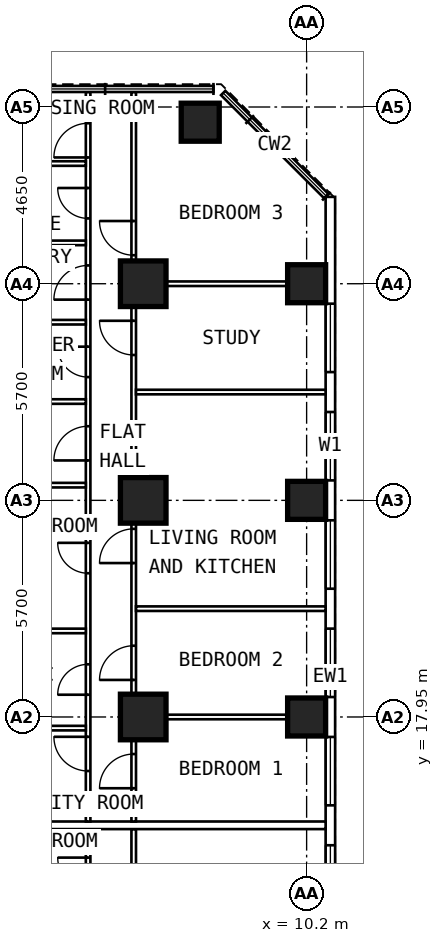
"""IFC4 building model, lengths in metres.
Left out: names, types, materials, properties, quantities, classifications, styles, units other than length and angle.
Written with IfcOpenShell. Run it as: python <this file> out.ifc"""

import sys

from ifc_helpers import new_model, si_unit, direction, frame, frame_2d, origin, origin_2d, place, context, subcontext, project, spatial, rectangle, extrude, element, fill, save


model = new_model("IFC4")
c1 = context("Model", 3, precision=1e-05, world=origin(), true_north=direction((0.0, 1.0)))
c2 = subcontext(c1, "Body", "Model", "MODEL_VIEW")
j1 = project(units=[si_unit("LENGTHUNIT", "METRE"), si_unit("PLANEANGLEUNIT", "RADIAN")], contexts=[c1])
p1 = place(None, origin())
s1 = spatial("IfcSite", under=j1, at=p1, CompositionType="ELEMENT")
p2 = place(p1, origin())
s2 = spatial("IfcBuilding", under=s1, at=p2, CompositionType="ELEMENT")
p3 = place(p2, frame((0.0, 0.0, 57.4)))
s3 = spatial("IfcBuildingStorey", under=s2, at=p3, CompositionType="ELEMENT", Elevation=57.4)
for number, where, z_axis, x_axis in (
    (1, (10.2, 17.95, 0.0), (0.0, 0.0, 1.0), (0.0, 1.0, 0.0)),
    (2, (10.2, 23.65, 0.0), (0.0, 0.0, 1.0), (0.0, 1.0, 0.0)),
    (3, (10.2, 29.35, 0.0), (0.0, 0.0, 1.0), (0.0, 1.0, 0.0)),
    (4, (7.4, 33.6, 0.0), (0.0, 0.0, 1.0), (0.0, 1.0, 0.0)),
):
    element("IfcColumn", number, at=place(p3, frame(where, z_axis=z_axis, x_axis=x_axis)), inside=s3, PredefinedType="COLUMN", context=c2, shape_type="SweptSolid", body=[
        extrude(rectangle(XDim=1.0, YDim=1.0, at=origin_2d()), origin(), (0.0, 0.0, 1.0), 3.6),
    ])
for number, where, z_axis, x_axis in (
    (5, (5.9, 17.95, 0.0), (0.0, 0.0, 1.0), (0.0, 1.0, 0.0)),
    (6, (5.9, 23.65, 0.0), (0.0, 0.0, 1.0), (0.0, 1.0, 0.0)),
    (7, (5.9, 29.35, 0.0), (0.0, 0.0, 1.0), (0.0, 1.0, 0.0)),
):
    element("IfcColumn", number, at=place(p3, frame(where, z_axis=z_axis, x_axis=x_axis)), inside=s3, PredefinedType="COLUMN", context=c2, shape_type="SweptSolid", body=[
        extrude(rectangle(XDim=1.2, YDim=1.2, at=origin_2d()), origin(), (0.0, 0.0, 1.0), 3.6),
    ])
p4 = place(p3, frame((10.825, 6.394, 0.0), z_axis=(0.0, 0.0, 1.0), x_axis=(0.0, 1.0, 0.0)))
e8 = element("IfcWall", 8, at=p4, inside=s3, PredefinedType="SOLIDWALL", context=c2, shape_type="SweptSolid", body=[
    extrude(rectangle(XDim=25.241, YDim=0.25, at=frame_2d((12.621, 0.0))), origin(), (0.0, 0.0, 1.0), 3.35),
])
p5 = place(p4, frame((0.681, 0.0, 0.8)))
e9 = element("IfcOpeningElement", 9, at=p5, cuts=e8, PredefinedType="OPENING", context=c2, shape_type="SweptSolid", body=[
    extrude(rectangle(XDim=1.8, YDim=1.8, at=frame_2d((0.9, 0.9))), frame((0.0, 0.137, 0.0), z_axis=(0.0, -1.0, 0.0), x_axis=(1.0, 0.0, 0.0)), (0.0, 0.0, 1.0), 0.274),
])
p6 = place(p4, frame((3.531, 0.0, 0.8)))
e10 = element("IfcOpeningElement", 10, at=p6, cuts=e8, PredefinedType="OPENING", context=c2, shape_type="SweptSolid", body=[
    extrude(rectangle(XDim=1.8, YDim=1.8, at=frame_2d((0.9, 0.9))), frame((0.0, 0.137, 0.0), z_axis=(0.0, -1.0, 0.0), x_axis=(1.0, 0.0, 0.0)), (0.0, 0.0, 1.0), 0.274),
])
p7 = place(p4, frame((6.381, 0.0, 0.8)))
e11 = element("IfcOpeningElement", 11, at=p7, cuts=e8, PredefinedType="OPENING", context=c2, shape_type="SweptSolid", body=[
    extrude(rectangle(XDim=1.8, YDim=1.8, at=frame_2d((0.9, 0.9))), frame((0.0, 0.137, 0.0), z_axis=(0.0, -1.0, 0.0), x_axis=(1.0, 0.0, 0.0)), (0.0, 0.0, 1.0), 0.274),
])
p8 = place(p4, frame((9.231, 0.0, 0.8)))
e12 = element("IfcOpeningElement", 12, at=p8, cuts=e8, PredefinedType="OPENING", context=c2, shape_type="SweptSolid", body=[
    extrude(rectangle(XDim=1.8, YDim=1.8, at=frame_2d((0.9, 0.9))), frame((0.0, 0.137, 0.0), z_axis=(0.0, -1.0, 0.0), x_axis=(1.0, 0.0, 0.0)), (0.0, 0.0, 1.0), 0.274),
])
p9 = place(p4, frame((12.081, 0.0, 0.8)))
e13 = element("IfcOpeningElement", 13, at=p9, cuts=e8, PredefinedType="OPENING", context=c2, shape_type="SweptSolid", body=[
    extrude(rectangle(XDim=1.8, YDim=1.8, at=frame_2d((0.9, 0.9))), frame((0.0, 0.137, 0.0), z_axis=(0.0, -1.0, 0.0), x_axis=(1.0, 0.0, 0.0)), (0.0, 0.0, 1.0), 0.274),
])
p10 = place(p4, frame((14.931, 0.0, 0.8)))
e14 = element("IfcOpeningElement", 14, at=p10, cuts=e8, PredefinedType="OPENING", context=c2, shape_type="SweptSolid", body=[
    extrude(rectangle(XDim=1.8, YDim=1.8, at=frame_2d((0.9, 0.9))), frame((0.0, 0.137, 0.0), z_axis=(0.0, -1.0, 0.0), x_axis=(1.0, 0.0, 0.0)), (0.0, 0.0, 1.0), 0.274),
])
p11 = place(p4, frame((17.781, 0.0, 0.8)))
e15 = element("IfcOpeningElement", 15, at=p11, cuts=e8, PredefinedType="OPENING", context=c2, shape_type="SweptSolid", body=[
    extrude(rectangle(XDim=1.8, YDim=1.8, at=frame_2d((0.9, 0.9))), frame((0.0, 0.137, 0.0), z_axis=(0.0, -1.0, 0.0), x_axis=(1.0, 0.0, 0.0)), (0.0, 0.0, 1.0), 0.274),
])
p12 = place(p4, frame((20.631, 0.0, 0.8)))
e16 = element("IfcOpeningElement", 16, at=p12, cuts=e8, PredefinedType="OPENING", context=c2, shape_type="SweptSolid", body=[
    extrude(rectangle(XDim=1.8, YDim=1.8, at=frame_2d((0.9, 0.9))), frame((0.0, 0.137, 0.0), z_axis=(0.0, -1.0, 0.0), x_axis=(1.0, 0.0, 0.0)), (0.0, 0.0, 1.0), 0.274),
])
p13 = place(p3, frame((4.45, 10.1, 0.0), z_axis=(0.0, 0.0, 1.0), x_axis=(0.0, 1.0, 0.0)))
e17 = element("IfcWall", 17, at=p13, inside=s3, PredefinedType="PARTITIONING", context=c2, shape_type="SweptSolid", body=[
    extrude(rectangle(XDim=4.9, YDim=0.12, at=frame_2d((2.45, 0.0))), origin(), (0.0, 0.0, 1.0), 3.35),
])
p14 = place(p13, frame((0.75, 0.0, 0.0)))
e18 = element("IfcOpeningElement", 18, at=p14, cuts=e17, PredefinedType="OPENING", context=c2, shape_type="SweptSolid", body=[
    extrude(rectangle(XDim=0.9, YDim=2.1, at=frame_2d((0.45, 1.05))), frame((0.0, 0.072, 0.0), z_axis=(0.0, -1.0, 0.0), x_axis=(1.0, 0.0, 0.0)), (0.0, 0.0, 1.0), 0.144),
])
p15 = place(p13, frame((3.35, 0.0, 0.0)))
e19 = element("IfcOpeningElement", 19, at=p15, cuts=e17, PredefinedType="OPENING", context=c2, shape_type="SweptSolid", body=[
    extrude(rectangle(XDim=0.8, YDim=2.1, at=frame_2d((0.4, 1.05))), frame((0.0, 0.072, 0.0), z_axis=(0.0, -1.0, 0.0), x_axis=(1.0, 0.0, 0.0)), (0.0, 0.0, 1.0), 0.144),
])
p16 = place(p3, frame((5.65, 9.6, 0.0), z_axis=(0.0, 0.0, 1.0), x_axis=(0.0, 1.0, 0.0)))
e20 = element("IfcWall", 20, at=p16, inside=s3, PredefinedType="PARTITIONING", context=c2, shape_type="SweptSolid", body=[
    extrude(rectangle(XDim=5.4, YDim=0.12, at=frame_2d((2.7, 0.0))), origin(), (0.0, 0.0, 1.0), 3.35),
])
p17 = place(p16, frame((3.4, 0.0, 0.0)))
e21 = element("IfcOpeningElement", 21, at=p17, cuts=e20, PredefinedType="OPENING", context=c2, shape_type="SweptSolid", body=[
    extrude(rectangle(XDim=0.9, YDim=2.1, at=frame_2d((0.45, 1.05))), frame((0.0, 0.072, 0.0), z_axis=(0.0, -1.0, 0.0), x_axis=(1.0, 0.0, 0.0)), (0.0, 0.0, 1.0), 0.144),
])
p18 = place(p3, frame((4.45, 15.2, 0.0), z_axis=(0.0, 0.0, 1.0), x_axis=(0.0, 1.0, 0.0)))
e22 = element("IfcWall", 22, at=p18, inside=s3, PredefinedType="PARTITIONING", context=c2, shape_type="SweptSolid", body=[
    extrude(rectangle(XDim=19.195, YDim=0.12, at=frame_2d((9.598, 0.0))), origin(), (0.0, 0.0, 1.0), 3.35),
])
p19 = place(p18, frame((1.329, 0.0, 0.0)))
e23 = element("IfcOpeningElement", 23, at=p19, cuts=e22, PredefinedType="OPENING", context=c2, shape_type="SweptSolid", body=[
    extrude(rectangle(XDim=0.9, YDim=2.1, at=frame_2d((0.45, 1.05))), frame((0.0, 0.072, 0.0), z_axis=(0.0, -1.0, 0.0), x_axis=(1.0, 0.0, 0.0)), (0.0, 0.0, 1.0), 0.144),
])
p20 = place(p18, frame((3.336, 0.0, 0.0)))
e24 = element("IfcOpeningElement", 24, at=p20, cuts=e22, PredefinedType="OPENING", context=c2, shape_type="SweptSolid", body=[
    extrude(rectangle(XDim=0.8, YDim=2.1, at=frame_2d((0.4, 1.05))), frame((0.0, 0.072, 0.0), z_axis=(0.0, -1.0, 0.0), x_axis=(1.0, 0.0, 0.0)), (0.0, 0.0, 1.0), 0.144),
])
p21 = place(p18, frame((6.532, 0.0, 0.0)))
e25 = element("IfcOpeningElement", 25, at=p21, cuts=e22, PredefinedType="OPENING", context=c2, shape_type="SweptSolid", body=[
    extrude(rectangle(XDim=0.8, YDim=2.1, at=frame_2d((0.4, 1.05))), frame((0.0, 0.072, 0.0), z_axis=(0.0, -1.0, 0.0), x_axis=(1.0, 0.0, 0.0)), (0.0, 0.0, 1.0), 0.144),
])
p22 = place(p18, frame((9.5, 0.0, 0.0)))
e26 = element("IfcOpeningElement", 26, at=p22, cuts=e22, PredefinedType="OPENING", context=c2, shape_type="SweptSolid", body=[
    extrude(rectangle(XDim=0.9, YDim=2.1, at=frame_2d((0.45, 1.05))), frame((0.0, 0.072, 0.0), z_axis=(0.0, -1.0, 0.0), x_axis=(1.0, 0.0, 0.0)), (0.0, 0.0, 1.0), 0.144),
])
p23 = place(p18, frame((11.694, 0.0, 0.0)))
e27 = element("IfcOpeningElement", 27, at=p23, cuts=e22, PredefinedType="OPENING", context=c2, shape_type="SweptSolid", body=[
    extrude(rectangle(XDim=0.8, YDim=2.1, at=frame_2d((0.4, 1.05))), frame((0.0, 0.072, 0.0), z_axis=(0.0, -1.0, 0.0), x_axis=(1.0, 0.0, 0.0)), (0.0, 0.0, 1.0), 0.144),
])
p24 = place(p18, frame((13.731, 0.0, 0.0)))
e28 = element("IfcOpeningElement", 28, at=p24, cuts=e22, PredefinedType="OPENING", context=c2, shape_type="SweptSolid", body=[
    extrude(rectangle(XDim=0.9, YDim=2.1, at=frame_2d((0.45, 1.05))), frame((0.0, 0.072, 0.0), z_axis=(0.0, -1.0, 0.0), x_axis=(1.0, 0.0, 0.0)), (0.0, 0.0, 1.0), 0.144),
])
p25 = place(p18, frame((15.869, 0.0, 0.0)))
e29 = element("IfcOpeningElement", 29, at=p25, cuts=e22, PredefinedType="OPENING", context=c2, shape_type="SweptSolid", body=[
    extrude(rectangle(XDim=0.8, YDim=2.1, at=frame_2d((0.4, 1.05))), frame((0.0, 0.072, 0.0), z_axis=(0.0, -1.0, 0.0), x_axis=(1.0, 0.0, 0.0)), (0.0, 0.0, 1.0), 0.144),
])
p26 = place(p18, frame((17.472, 0.0, 0.0)))
e30 = element("IfcOpeningElement", 30, at=p26, cuts=e22, PredefinedType="OPENING", context=c2, shape_type="SweptSolid", body=[
    extrude(rectangle(XDim=0.9, YDim=2.1, at=frame_2d((0.45, 1.05))), frame((0.0, 0.072, 0.0), z_axis=(0.0, -1.0, 0.0), x_axis=(1.0, 0.0, 0.0)), (0.0, 0.0, 1.0), 0.144),
])
p27 = place(p3, frame((5.65, 15.2, 0.0), z_axis=(0.0, 0.0, 1.0), x_axis=(0.0, 1.0, 0.0)))
e31 = element("IfcWall", 31, at=p27, inside=s3, PredefinedType="PARTITIONING", context=c2, shape_type="SweptSolid", body=[
    extrude(rectangle(XDim=19.195, YDim=0.12, at=frame_2d((9.598, 0.0))), origin(), (0.0, 0.0, 1.0), 3.35),
])
p28 = place(p27, frame((0.875, 0.0, 0.0)))
e32 = element("IfcOpeningElement", 32, at=p28, cuts=e31, PredefinedType="OPENING", context=c2, shape_type="SweptSolid", body=[
    extrude(rectangle(XDim=0.9, YDim=2.1, at=frame_2d((0.45, 1.05))), frame((0.0, 0.072, 0.0), z_axis=(0.0, -1.0, 0.0), x_axis=(1.0, 0.0, 0.0)), (0.0, 0.0, 1.0), 0.144),
])
p29 = place(p27, frame((3.725, 0.0, 0.0)))
e33 = element("IfcOpeningElement", 33, at=p29, cuts=e31, PredefinedType="OPENING", context=c2, shape_type="SweptSolid", body=[
    extrude(rectangle(XDim=0.9, YDim=2.1, at=frame_2d((0.45, 1.05))), frame((0.0, 0.072, 0.0), z_axis=(0.0, -1.0, 0.0), x_axis=(1.0, 0.0, 0.0)), (0.0, 0.0, 1.0), 0.144),
])
p30 = place(p27, frame((6.8, 0.0, 0.0)))
e34 = element("IfcOpeningElement", 34, at=p30, cuts=e31, PredefinedType="OPENING", context=c2, shape_type="SweptSolid", body=[
    extrude(rectangle(XDim=0.9, YDim=2.1, at=frame_2d((0.45, 1.05))), frame((0.0, 0.072, 0.0), z_axis=(0.0, -1.0, 0.0), x_axis=(1.0, 0.0, 0.0)), (0.0, 0.0, 1.0), 0.144),
])
p31 = place(p27, frame((12.275, 0.0, 0.0)))
e35 = element("IfcOpeningElement", 35, at=p31, cuts=e31, PredefinedType="OPENING", context=c2, shape_type="SweptSolid", body=[
    extrude(rectangle(XDim=0.9, YDim=2.1, at=frame_2d((0.45, 1.05))), frame((0.0, 0.072, 0.0), z_axis=(0.0, -1.0, 0.0), x_axis=(1.0, 0.0, 0.0)), (0.0, 0.0, 1.0), 0.144),
])
p32 = place(p27, frame((14.9, 0.0, 0.0)))
e36 = element("IfcOpeningElement", 36, at=p32, cuts=e31, PredefinedType="OPENING", context=c2, shape_type="SweptSolid", body=[
    extrude(rectangle(XDim=0.9, YDim=2.1, at=frame_2d((0.45, 1.05))), frame((0.0, 0.072, 0.0), z_axis=(0.0, -1.0, 0.0), x_axis=(1.0, 0.0, 0.0)), (0.0, 0.0, 1.0), 0.144),
])
p33 = place(p3, frame((5.71, 17.95, 0.0), z_axis=(0.0, 0.0, 1.0), x_axis=(1.0, 0.0, 0.0)))
e37 = element("IfcWall", 37, at=p33, inside=s3, PredefinedType="PARTITIONING", context=c2, shape_type="SweptSolid", body=[
    extrude(rectangle(XDim=4.99, YDim=0.12, at=frame_2d((2.495, 0.0))), origin(), (0.0, 0.0, 1.0), 2.45),
])
for number, where, z_axis, x_axis in (
    (38, (5.71, 20.8, 0.0), (0.0, 0.0, 1.0), (1.0, 0.0, 0.0)),
    (39, (5.71, 26.5, 0.0), (0.0, 0.0, 1.0), (1.0, 0.0, 0.0)),
):
    element("IfcWall", number, at=place(p3, frame(where, z_axis=z_axis, x_axis=x_axis)), inside=s3, PredefinedType="PARTITIONING", context=c2, shape_type="SweptSolid", body=[
        extrude(rectangle(XDim=4.99, YDim=0.12, at=frame_2d((2.495, 0.0))), origin(), (0.0, 0.0, 1.0), 3.35),
    ])
p34 = place(p3, frame((5.71, 29.35, 0.0), z_axis=(0.0, 0.0, 1.0), x_axis=(1.0, 0.0, 0.0)))
e40 = element("IfcWall", 40, at=p34, inside=s3, PredefinedType="PARTITIONING", context=c2, shape_type="SweptSolid", body=[
    extrude(rectangle(XDim=4.99, YDim=0.12, at=frame_2d((2.495, 0.0))), origin(), (0.0, 0.0, 1.0), 2.45),
])
p35 = place(p3, frame((2.1, 17.657, 0.0), z_axis=(0.0, 0.0, 1.0), x_axis=(1.0, 0.0, 0.0)))
e41 = element("IfcWall", 41, at=p35, inside=s3, PredefinedType="PARTITIONING", context=c2, shape_type="SweptSolid", body=[
    extrude(rectangle(XDim=2.29, YDim=0.12, at=frame_2d((1.145, 0.0))), origin(), (0.0, 0.0, 1.0), 2.45),
])
for number, where, z_axis, x_axis in (
    (42, (2.1, 20.214, 0.0), (0.0, 0.0, 1.0), (1.0, 0.0, 0.0)),
    (43, (2.1, 24.05, 0.0), (0.0, 0.0, 1.0), (1.0, 0.0, 0.0)),
    (44, (2.1, 26.25, 0.0), (0.0, 0.0, 1.0), (1.0, 0.0, 0.0)),
    (45, (2.1, 28.337, 0.0), (0.0, 0.0, 1.0), (1.0, 0.0, 0.0)),
    (46, (2.1, 30.425, 0.0), (0.0, 0.0, 1.0), (1.0, 0.0, 0.0)),
    (47, (2.1, 32.512, 0.0), (0.0, 0.0, 1.0), (1.0, 0.0, 0.0)),
):
    element("IfcWall", number, at=place(p3, frame(where, z_axis=z_axis, x_axis=x_axis)), inside=s3, PredefinedType="PARTITIONING", context=c2, shape_type="SweptSolid", body=[
        extrude(rectangle(XDim=2.29, YDim=0.12, at=frame_2d((1.145, 0.0))), origin(), (0.0, 0.0, 1.0), 3.35),
    ])
p36 = place(p3, frame((2.1, 15.1, 0.0), z_axis=(0.0, 0.0, 1.0), x_axis=(1.0, 0.0, 0.0)))
e48 = element("IfcWall", 48, at=p36, inside=s3, PredefinedType="PARTITIONING", context=c2, shape_type="SweptSolid", body=[
    extrude(rectangle(XDim=8.6, YDim=0.2, at=frame_2d((4.3, 0.0))), origin(), (0.0, 0.0, 1.0), 3.35),
])
p37 = place(p7, origin())
e49 = element("IfcWindow", 49, at=p37, inside=s3, PartitioningType="SINGLE_PANEL", PredefinedType="WINDOW", context=c2, shape_type="SweptSolid", body=[
    extrude(rectangle(XDim=1.8, YDim=1.8, at=frame_2d((0.9, 0.9))), frame((0.0, 0.03, 0.0), z_axis=(0.0, -1.0, 0.0), x_axis=(1.0, 0.0, 0.0)), (0.0, 0.0, 1.0), 0.06),
])
fill(e11, e49)
p38 = place(p8, origin())
e50 = element("IfcWindow", 50, at=p38, inside=s3, PartitioningType="SINGLE_PANEL", PredefinedType="WINDOW", context=c2, shape_type="SweptSolid", body=[
    extrude(rectangle(XDim=1.8, YDim=1.8, at=frame_2d((0.9, 0.9))), frame((0.0, 0.03, 0.0), z_axis=(0.0, -1.0, 0.0), x_axis=(1.0, 0.0, 0.0)), (0.0, 0.0, 1.0), 0.06),
])
fill(e12, e50)
p39 = place(p9, origin())
e51 = element("IfcWindow", 51, at=p39, inside=s3, PartitioningType="SINGLE_PANEL", PredefinedType="WINDOW", context=c2, shape_type="SweptSolid", body=[
    extrude(rectangle(XDim=1.8, YDim=1.8, at=frame_2d((0.9, 0.9))), frame((0.0, 0.03, 0.0), z_axis=(0.0, -1.0, 0.0), x_axis=(1.0, 0.0, 0.0)), (0.0, 0.0, 1.0), 0.06),
])
fill(e13, e51)
p40 = place(p10, origin())
e52 = element("IfcWindow", 52, at=p40, inside=s3, PartitioningType="SINGLE_PANEL", PredefinedType="WINDOW", context=c2, shape_type="SweptSolid", body=[
    extrude(rectangle(XDim=1.8, YDim=1.8, at=frame_2d((0.9, 0.9))), frame((0.0, 0.03, 0.0), z_axis=(0.0, -1.0, 0.0), x_axis=(1.0, 0.0, 0.0)), (0.0, 0.0, 1.0), 0.06),
])
fill(e14, e52)
p41 = place(p11, origin())
e53 = element("IfcWindow", 53, at=p41, inside=s3, PartitioningType="SINGLE_PANEL", PredefinedType="WINDOW", context=c2, shape_type="SweptSolid", body=[
    extrude(rectangle(XDim=1.8, YDim=1.8, at=frame_2d((0.9, 0.9))), frame((0.0, 0.03, 0.0), z_axis=(0.0, -1.0, 0.0), x_axis=(1.0, 0.0, 0.0)), (0.0, 0.0, 1.0), 0.06),
])
fill(e15, e53)
p42 = place(p12, origin())
e54 = element("IfcWindow", 54, at=p42, inside=s3, PartitioningType="SINGLE_PANEL", PredefinedType="WINDOW", context=c2, shape_type="SweptSolid", body=[
    extrude(rectangle(XDim=1.8, YDim=1.8, at=frame_2d((0.9, 0.9))), frame((0.0, 0.03, 0.0), z_axis=(0.0, -1.0, 0.0), x_axis=(1.0, 0.0, 0.0)), (0.0, 0.0, 1.0), 0.06),
])
fill(e16, e54)
p43 = place(p15, origin())
e55 = element("IfcDoor", 55, at=p43, inside=s3, OperationType="SINGLE_SWING_RIGHT", PredefinedType="DOOR", context=c2, shape_type="SweptSolid", body=[
    extrude(rectangle(XDim=0.8, YDim=2.1, at=frame_2d((0.4, 1.05))), frame((0.0, 0.025, 0.0), z_axis=(0.0, -1.0, 0.0), x_axis=(1.0, 0.0, 0.0)), (0.0, 0.0, 1.0), 0.05),
])
fill(e19, e55)
p44 = place(p28, origin())
e56 = element("IfcDoor", 56, at=p44, inside=s3, OperationType="SINGLE_SWING_LEFT", PredefinedType="DOOR", context=c2, shape_type="SweptSolid", body=[
    extrude(rectangle(XDim=0.9, YDim=2.1, at=frame_2d((0.45, 1.05))), frame((0.0, 0.025, 0.0), z_axis=(0.0, -1.0, 0.0), x_axis=(1.0, 0.0, 0.0)), (0.0, 0.0, 1.0), 0.05),
])
fill(e32, e56)
p45 = place(p29, origin())
e57 = element("IfcDoor", 57, at=p45, inside=s3, OperationType="SINGLE_SWING_LEFT", PredefinedType="DOOR", context=c2, shape_type="SweptSolid", body=[
    extrude(rectangle(XDim=0.9, YDim=2.1, at=frame_2d((0.45, 1.05))), frame((0.0, 0.025, 0.0), z_axis=(0.0, -1.0, 0.0), x_axis=(1.0, 0.0, 0.0)), (0.0, 0.0, 1.0), 0.05),
])
fill(e33, e57)
p46 = place(p30, origin())
e58 = element("IfcDoor", 58, at=p46, inside=s3, OperationType="SINGLE_SWING_LEFT", PredefinedType="DOOR", context=c2, shape_type="SweptSolid", body=[
    extrude(rectangle(XDim=0.9, YDim=2.1, at=frame_2d((0.45, 1.05))), frame((0.0, 0.025, 0.0), z_axis=(0.0, -1.0, 0.0), x_axis=(1.0, 0.0, 0.0)), (0.0, 0.0, 1.0), 0.05),
])
fill(e34, e58)
p47 = place(p31, origin())
e59 = element("IfcDoor", 59, at=p47, inside=s3, OperationType="SINGLE_SWING_RIGHT", PredefinedType="DOOR", context=c2, shape_type="SweptSolid", body=[
    extrude(rectangle(XDim=0.9, YDim=2.1, at=frame_2d((0.45, 1.05))), frame((0.0, 0.025, 0.0), z_axis=(0.0, -1.0, 0.0), x_axis=(1.0, 0.0, 0.0)), (0.0, 0.0, 1.0), 0.05),
])
fill(e35, e59)
p48 = place(p32, origin())
e60 = element("IfcDoor", 60, at=p48, inside=s3, OperationType="SINGLE_SWING_RIGHT", PredefinedType="DOOR", context=c2, shape_type="SweptSolid", body=[
    extrude(rectangle(XDim=0.9, YDim=2.1, at=frame_2d((0.45, 1.05))), frame((0.0, 0.025, 0.0), z_axis=(0.0, -1.0, 0.0), x_axis=(1.0, 0.0, 0.0)), (0.0, 0.0, 1.0), 0.05),
])
fill(e36, e60)
p49 = place(p19, origin())
e61 = element("IfcDoor", 61, at=p49, inside=s3, OperationType="SINGLE_SWING_RIGHT", PredefinedType="DOOR", context=c2, shape_type="SweptSolid", body=[
    extrude(rectangle(XDim=0.9, YDim=2.1, at=frame_2d((0.45, 1.05))), frame((0.0, 0.025, 0.0), z_axis=(0.0, -1.0, 0.0), x_axis=(1.0, 0.0, 0.0)), (0.0, 0.0, 1.0), 0.05),
])
fill(e23, e61)
p50 = place(p20, origin())
e62 = element("IfcDoor", 62, at=p50, inside=s3, OperationType="SINGLE_SWING_LEFT", PredefinedType="DOOR", context=c2, shape_type="SweptSolid", body=[
    extrude(rectangle(XDim=0.8, YDim=2.1, at=frame_2d((0.4, 1.05))), frame((0.0, 0.025, 0.0), z_axis=(0.0, -1.0, 0.0), x_axis=(1.0, 0.0, 0.0)), (0.0, 0.0, 1.0), 0.05),
])
fill(e24, e62)
p51 = place(p21, origin())
e63 = element("IfcDoor", 63, at=p51, inside=s3, OperationType="SINGLE_SWING_RIGHT", PredefinedType="DOOR", context=c2, shape_type="SweptSolid", body=[
    extrude(rectangle(XDim=0.8, YDim=2.1, at=frame_2d((0.4, 1.05))), frame((0.0, 0.025, 0.0), z_axis=(0.0, -1.0, 0.0), x_axis=(1.0, 0.0, 0.0)), (0.0, 0.0, 1.0), 0.05),
])
fill(e25, e63)
p52 = place(p22, origin())
e64 = element("IfcDoor", 64, at=p52, inside=s3, OperationType="SINGLE_SWING_LEFT", PredefinedType="DOOR", context=c2, shape_type="SweptSolid", body=[
    extrude(rectangle(XDim=0.9, YDim=2.1, at=frame_2d((0.45, 1.05))), frame((0.0, 0.025, 0.0), z_axis=(0.0, -1.0, 0.0), x_axis=(1.0, 0.0, 0.0)), (0.0, 0.0, 1.0), 0.05),
])
fill(e26, e64)
p53 = place(p23, origin())
e65 = element("IfcDoor", 65, at=p53, inside=s3, OperationType="SINGLE_SWING_RIGHT", PredefinedType="DOOR", context=c2, shape_type="SweptSolid", body=[
    extrude(rectangle(XDim=0.8, YDim=2.1, at=frame_2d((0.4, 1.05))), frame((0.0, 0.025, 0.0), z_axis=(0.0, -1.0, 0.0), x_axis=(1.0, 0.0, 0.0)), (0.0, 0.0, 1.0), 0.05),
])
fill(e27, e65)
p54 = place(p24, origin())
e66 = element("IfcDoor", 66, at=p54, inside=s3, OperationType="SINGLE_SWING_LEFT", PredefinedType="DOOR", context=c2, shape_type="SweptSolid", body=[
    extrude(rectangle(XDim=0.9, YDim=2.1, at=frame_2d((0.45, 1.05))), frame((0.0, 0.025, 0.0), z_axis=(0.0, -1.0, 0.0), x_axis=(1.0, 0.0, 0.0)), (0.0, 0.0, 1.0), 0.05),
])
fill(e28, e66)
p55 = place(p25, origin())
e67 = element("IfcDoor", 67, at=p55, inside=s3, OperationType="SINGLE_SWING_RIGHT", PredefinedType="DOOR", context=c2, shape_type="SweptSolid", body=[
    extrude(rectangle(XDim=0.8, YDim=2.1, at=frame_2d((0.4, 1.05))), frame((0.0, 0.025, 0.0), z_axis=(0.0, -1.0, 0.0), x_axis=(1.0, 0.0, 0.0)), (0.0, 0.0, 1.0), 0.05),
])
fill(e29, e67)
p56 = place(p26, origin())
e68 = element("IfcDoor", 68, at=p56, inside=s3, OperationType="SINGLE_SWING_LEFT", PredefinedType="DOOR", context=c2, shape_type="SweptSolid", body=[
    extrude(rectangle(XDim=0.9, YDim=2.1, at=frame_2d((0.45, 1.05))), frame((0.0, 0.025, 0.0), z_axis=(0.0, -1.0, 0.0), x_axis=(1.0, 0.0, 0.0)), (0.0, 0.0, 1.0), 0.05),
])
fill(e30, e68)
save(model, sys.argv[1])
